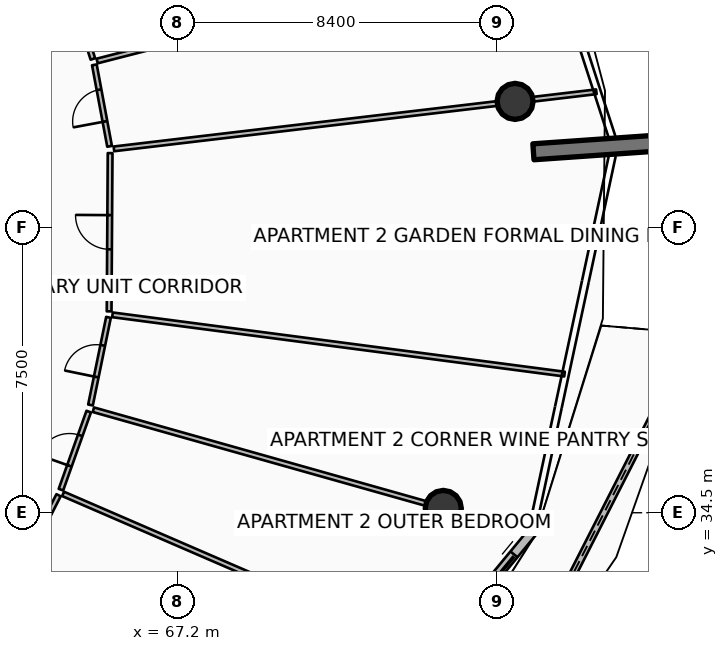
"""IFC4 building model, lengths in metres.
Left out: names, types, materials, properties, quantities, classifications, styles, units other than length and angle.
Written with IfcOpenShell. Run it as: python <this file> out.ifc"""

import sys

from ifc_helpers import new_model, si_unit, direction, frame, frame_2d, origin, origin_2d, place, context, subcontext, project, spatial, polyline, rectangle, circle, outline, extrude, element, fill, save


model = new_model("IFC4")
c1 = context("Model", 3, precision=1e-05, world=origin(), true_north=direction((0.0, 1.0)))
c2 = subcontext(c1, "Body", "Model", "MODEL_VIEW")
j1 = project(units=[si_unit("LENGTHUNIT", "METRE"), si_unit("PLANEANGLEUNIT", "RADIAN")], contexts=[c1])
p1 = place(None, origin())
s1 = spatial("IfcSite", under=j1, at=p1, CompositionType="ELEMENT")
p2 = place(p1, origin())
s2 = spatial("IfcBuilding", under=s1, at=p2, CompositionType="ELEMENT")
p3 = place(p2, frame((0.0, 0.0, 302.15)))
s3 = spatial("IfcBuildingStorey", under=s2, at=p3, CompositionType="ELEMENT", Elevation=302.15)
p4 = place(p3, frame((76.562, 43.997, 0.0), z_axis=(0.0, 0.0, 1.0), x_axis=(0.997563824095, 0.069759707979, 0.0)))
e1 = element("IfcWall", 1, at=p4, inside=s3, PredefinedType="SOLIDWALL", context=c2, shape_type="SweptSolid", body=[
    extrude(rectangle(XDim=3.5, YDim=0.42, at=frame_2d((1.75, 0.0))), origin(), (0.0, 0.0, 1.0), 3.85),
])
p5 = place(p3, frame((74.191, 34.613, 0.0), z_axis=(-0.301218130551, 0.085015826673, 0.949757835999), x_axis=(-0.271628463208, -0.962402191381, 0.0)))
e2 = element("IfcColumn", 2, at=p5, inside=s3, PredefinedType="COLUMN", context=c2, shape_type="SweptSolid", body=[
    extrude(circle(Radius=0.475, at=origin_2d()), origin(), (0.0, 0.0, 1.0), 3.633),
])
p6 = place(p3, frame((76.08, 45.323, 0.0), z_axis=(-0.321796334521, -0.038090724848, 0.946042396391), x_axis=(0.117548410709, -0.993067153389, 0.0)))
e3 = element("IfcColumn", 3, at=p6, inside=s3, PredefinedType="COLUMN", context=c2, shape_type="SweptSolid", body=[
    extrude(circle(Radius=0.475, at=origin_2d()), origin(), (0.0, 0.0, 1.0), 3.647),
])
p7 = place(p3, frame((75.242, 28.254, 0.0), z_axis=(0.0, 0.0, 1.0), x_axis=(0.45375182612, 0.891128094211, 0.0)))
e4 = element("IfcWall", 4, at=p7, inside=s3, PredefinedType="PARAPET", context=c2, shape_type="SweptSolid", body=[
    extrude(outline(polyline([(0.0, 0.0), (12.3, 0.0), (12.3, 1.747), (6.15, 1.562), (0.0, 1.348), (0.0, 0.0)])), frame((0.0, 0.09, 0.0), z_axis=(0.0, -1.0, 0.0), x_axis=(1.0, 0.0, 0.0)), (0.0, 0.0, 1.0), 0.18),
])
p8 = place(p3, frame((69.258, 25.178, 0.0), z_axis=(0.0, 0.0, 1.0), x_axis=(0.636680093065, 0.771128043255, 0.0)))
e5 = element("IfcWall", 5, at=p8, inside=s3, PredefinedType="SOLIDWALL", context=c2, shape_type="SweptSolid", body=[
    extrude(rectangle(XDim=11.438, YDim=0.24, at=frame_2d((5.719, 0.0))), origin(), (0.0, 0.0, 1.0), 2.4),
])
p9 = place(p8, frame((9.218, 0.0, 0.0)))
e6 = element("IfcOpeningElement", 6, at=p9, cuts=e5, PredefinedType="OPENING", context=c2, shape_type="SweptSolid", body=[
    extrude(rectangle(XDim=1.45, YDim=2.15, at=frame_2d((0.725, 1.075))), frame((0.0, 0.13, 0.0), z_axis=(0.0, -1.0, 0.0), x_axis=(1.0, 0.0, 0.0)), (0.0, 0.0, 1.0), 0.26),
])
p10 = place(p8, frame((0.28, 0.0, 0.65)))
e7 = element("IfcOpeningElement", 7, at=p10, cuts=e5, PredefinedType="OPENING", context=c2, shape_type="SweptSolid", body=[
    extrude(rectangle(XDim=1.6, YDim=1.5, at=frame_2d((0.8, 0.75))), frame((0.0, 0.13, 0.0), z_axis=(0.0, -1.0, 0.0), x_axis=(1.0, 0.0, 0.0)), (0.0, 0.0, 1.0), 0.26),
])
p11 = place(p3, frame((63.18, 33.023, 0.0), z_axis=(0.0, 0.0, 1.0), x_axis=(0.860726523095, -0.509067630517, 0.0)))
e8 = element("IfcWall", 8, at=p11, inside=s3, PredefinedType="PARTITIONING", context=c2, shape_type="SweptSolid", body=[
    extrude(rectangle(XDim=9.675, YDim=0.125, at=frame_2d((4.837, 0.0))), origin(), (0.0, 0.0, 1.0), 2.425),
])
p12 = place(p3, frame((64.186, 34.996, 0.0), z_axis=(0.0, 0.0, 1.0), x_axis=(0.917756293165, -0.397144037292, 0.0)))
e9 = element("IfcWall", 9, at=p12, inside=s3, PredefinedType="PARTITIONING", context=c2, shape_type="SweptSolid", body=[
    extrude(rectangle(XDim=10.454, YDim=0.125, at=frame_2d((5.227, 0.0))), origin(), (0.0, 0.0, 1.0), 2.425),
])
p13 = place(p3, frame((63.139, 33.14, 0.0), z_axis=(0.0, 0.0, 1.0), x_axis=(0.454034960647, 0.890983868827, 0.0)))
e10 = element("IfcWall", 10, at=p13, inside=s3, PredefinedType="PARTITIONING", context=c2, shape_type="SweptSolid", body=[
    extrude(rectangle(XDim=2.043, YDim=0.125, at=frame_2d((1.021, 0.0))), origin(), (0.0, 0.0, 1.0), 2.89),
])
p14 = place(p13, frame((0.597, 0.0, 0.0)))
e11 = element("IfcOpeningElement", 11, at=p14, cuts=e10, PredefinedType="OPENING", context=c2, shape_type="SweptSolid", body=[
    extrude(rectangle(XDim=0.85, YDim=2.06, at=frame_2d((0.425, 1.03))), frame((0.0, 0.073, 0.0), z_axis=(0.0, -1.0, 0.0), x_axis=(1.0, 0.0, 0.0)), (0.0, 0.0, 1.0), 0.145),
])
p15 = place(p3, frame((64.13, 35.107, 0.0), z_axis=(0.0, 0.0, 1.0), x_axis=(0.335038376523, 0.942204482189, 0.0)))
e12 = element("IfcWall", 12, at=p15, inside=s3, PredefinedType="PARTITIONING", context=c2, shape_type="SweptSolid", body=[
    extrude(rectangle(XDim=2.181, YDim=0.125, at=frame_2d((1.09, 0.0))), origin(), (0.0, 0.0, 1.0), 2.407),
])
p16 = place(p15, frame((0.666, 0.0, 0.0)))
e13 = element("IfcOpeningElement", 13, at=p16, cuts=e12, PredefinedType="OPENING", context=c2, shape_type="SweptSolid", body=[
    extrude(rectangle(XDim=0.85, YDim=2.06, at=frame_2d((0.425, 1.03))), frame((0.0, 0.073, 0.0), z_axis=(0.0, -1.0, 0.0), x_axis=(1.0, 0.0, 0.0)), (0.0, 0.0, 1.0), 0.145),
])
p17 = place(p3, frame((64.983, 37.21, 0.0), z_axis=(0.0, 0.0, 1.0), x_axis=(0.962453678557, -0.271445973691, 0.0)))
e14 = element("IfcWall", 14, at=p17, inside=s3, PredefinedType="PARTITIONING", context=c2, shape_type="SweptSolid", body=[
    extrude(rectangle(XDim=11.85, YDim=0.125, at=frame_2d((5.925, 0.0))), origin(), (0.0, 0.0, 1.0), 2.407),
])
p18 = place(p3, frame((65.486, 39.707, 0.0), z_axis=(0.0, 0.0, 1.0), x_axis=(0.991513831428, -0.130001238792, 0.0)))
e15 = element("IfcWall", 15, at=p18, inside=s3, PredefinedType="PARTITIONING", context=c2, shape_type="SweptSolid", body=[
    extrude(rectangle(XDim=11.997, YDim=0.125, at=frame_2d((5.998, 0.0))), origin(), (0.0, 0.0, 1.0), 2.425),
])
p19 = place(p3, frame((64.907, 37.335, 0.0), z_axis=(0.0, 0.0, 1.0), x_axis=(0.201360200042, 0.979517263676, 0.0)))
e16 = element("IfcWall", 16, at=p19, inside=s3, PredefinedType="PARTITIONING", context=c2, shape_type="SweptSolid", body=[
    extrude(rectangle(XDim=2.353, YDim=0.125, at=frame_2d((1.177, 0.0))), origin(), (0.0, 0.0, 1.0), 2.407),
])
p20 = place(p19, frame((0.752, 0.0, 0.0)))
e17 = element("IfcOpeningElement", 17, at=p20, cuts=e16, PredefinedType="OPENING", context=c2, shape_type="SweptSolid", body=[
    extrude(rectangle(XDim=0.85, YDim=2.06, at=frame_2d((0.425, 1.03))), frame((0.0, 0.073, 0.0), z_axis=(0.0, -1.0, 0.0), x_axis=(1.0, 0.0, 0.0)), (0.0, 0.0, 1.0), 0.145),
])
p21 = place(p3, frame((65.398, 39.799, 0.0), z_axis=(0.0, 0.0, 1.0), x_axis=(0.006274064384, 0.999980317864, 0.0)))
e18 = element("IfcWall", 18, at=p21, inside=s3, PredefinedType="PARTITIONING", context=c2, shape_type="SweptSolid", body=[
    extrude(rectangle(XDim=4.164, YDim=0.125, at=frame_2d((2.082, 0.0))), origin(), (0.0, 0.0, 1.0), 2.407),
])
p22 = place(p21, frame((1.632, 0.0, 0.0)))
e19 = element("IfcOpeningElement", 19, at=p22, cuts=e18, PredefinedType="OPENING", context=c2, shape_type="SweptSolid", body=[
    extrude(rectangle(XDim=0.9, YDim=2.08, at=frame_2d((0.45, 1.04))), frame((0.0, 0.073, 0.0), z_axis=(0.0, -1.0, 0.0), x_axis=(1.0, 0.0, 0.0)), (0.0, 0.0, 1.0), 0.145),
])
p23 = place(p3, frame((65.524, 44.074, 0.0), z_axis=(0.0, 0.0, 1.0), x_axis=(0.993069543008, 0.117528221075, 0.0)))
e20 = element("IfcWall", 20, at=p23, inside=s3, PredefinedType="PARTITIONING", context=c2, shape_type="SweptSolid", body=[
    extrude(rectangle(XDim=12.784, YDim=0.125, at=frame_2d((6.392, 0.0))), origin(), (0.0, 0.0, 1.0), 2.407),
])
p24 = place(p3, frame((65.082, 46.386, 0.0), z_axis=(0.0, 0.0, 1.0), x_axis=(0.968583522114, 0.248688481217, 0.0)))
e21 = element("IfcWall", 21, at=p24, inside=s3, PredefinedType="PARTITIONING", context=c2, shape_type="SweptSolid", body=[
    extrude(rectangle(XDim=12.268, YDim=0.125, at=frame_2d((6.134, 0.0))), origin(), (0.0, 0.0, 1.0), 2.425),
])
p25 = place(p3, frame((65.41, 44.141, 0.0), z_axis=(0.0, 0.0, 1.0), x_axis=(-0.183463941639, 0.983026440193, 0.0)))
e22 = element("IfcWall", 22, at=p25, inside=s3, PredefinedType="PARTITIONING", context=c2, shape_type="SweptSolid", body=[
    extrude(rectangle(XDim=2.181, YDim=0.125, at=frame_2d((1.091, 0.0))), origin(), (0.0, 0.0, 1.0), 2.407),
])
p26 = place(p25, frame((0.666, 0.0, 0.0)))
e23 = element("IfcOpeningElement", 23, at=p26, cuts=e22, PredefinedType="OPENING", context=c2, shape_type="SweptSolid", body=[
    extrude(rectangle(XDim=0.85, YDim=2.06, at=frame_2d((0.425, 1.03))), frame((0.0, 0.073, 0.0), z_axis=(0.0, -1.0, 0.0), x_axis=(1.0, 0.0, 0.0)), (0.0, 0.0, 1.0), 0.145),
])
p27 = place(p3, frame((64.97, 46.44, 0.0), z_axis=(0.0, 0.0, 1.0), x_axis=(-0.305370578234, 0.952233590013, 0.0)))
e24 = element("IfcWall", 24, at=p27, inside=s3, PredefinedType="PARTITIONING", context=c2, shape_type="SweptSolid", body=[
    extrude(rectangle(XDim=1.906, YDim=0.125, at=frame_2d((0.953, 0.0))), origin(), (0.0, 0.0, 1.0), 2.89),
])
p28 = place(p27, frame((0.528, 0.0, 0.0)))
e25 = element("IfcOpeningElement", 25, at=p28, cuts=e24, PredefinedType="OPENING", context=c2, shape_type="SweptSolid", body=[
    extrude(rectangle(XDim=0.85, YDim=2.06, at=frame_2d((0.425, 1.03))), frame((0.0, 0.073, 0.0), z_axis=(0.0, -1.0, 0.0), x_axis=(1.0, 0.0, 0.0)), (0.0, 0.0, 1.0), 0.145),
])
p29 = place(p9, origin())
e26 = element("IfcDoor", 26, at=p29, inside=s3, OperationType="DOUBLE_DOOR_SLIDING", PredefinedType="DOOR", context=c2, shape_type="SweptSolid", body=[
    extrude(rectangle(XDim=1.45, YDim=2.15, at=frame_2d((0.725, 1.075))), frame((0.0, 0.025, 0.0), z_axis=(0.0, -1.0, 0.0), x_axis=(1.0, 0.0, 0.0)), (0.0, 0.0, 1.0), 0.05),
])
fill(e6, e26)
p30 = place(p16, origin())
e27 = element("IfcDoor", 27, at=p30, inside=s3, OperationType="SINGLE_SWING_LEFT", PredefinedType="DOOR", context=c2, shape_type="SweptSolid", body=[
    extrude(rectangle(XDim=0.85, YDim=2.06, at=frame_2d((0.425, 1.03))), frame((0.0, 0.025, 0.0), z_axis=(0.0, -1.0, 0.0), x_axis=(1.0, 0.0, 0.0)), (0.0, 0.0, 1.0), 0.05),
])
fill(e13, e27)
p31 = place(p20, origin())
e28 = element("IfcDoor", 28, at=p31, inside=s3, OperationType="SINGLE_SWING_LEFT", PredefinedType="DOOR", context=c2, shape_type="SweptSolid", body=[
    extrude(rectangle(XDim=0.85, YDim=2.06, at=frame_2d((0.425, 1.03))), frame((0.0, 0.025, 0.0), z_axis=(0.0, -1.0, 0.0), x_axis=(1.0, 0.0, 0.0)), (0.0, 0.0, 1.0), 0.05),
])
fill(e17, e28)
p32 = place(p22, origin())
e29 = element("IfcDoor", 29, at=p32, inside=s3, OperationType="SINGLE_SWING_RIGHT", PredefinedType="DOOR", context=c2, shape_type="SweptSolid", body=[
    extrude(rectangle(XDim=0.9, YDim=2.08, at=frame_2d((0.45, 1.04))), frame((0.0, 0.025, 0.0), z_axis=(0.0, -1.0, 0.0), x_axis=(1.0, 0.0, 0.0)), (0.0, 0.0, 1.0), 0.05),
])
fill(e19, e29)
p33 = place(p26, origin())
e30 = element("IfcDoor", 30, at=p33, inside=s3, OperationType="SINGLE_SWING_LEFT", PredefinedType="DOOR", context=c2, shape_type="SweptSolid", body=[
    extrude(rectangle(XDim=0.85, YDim=2.06, at=frame_2d((0.425, 1.03))), frame((0.0, 0.025, 0.0), z_axis=(0.0, -1.0, 0.0), x_axis=(1.0, 0.0, 0.0)), (0.0, 0.0, 1.0), 0.05),
])
fill(e23, e30)
save(model, sys.argv[1])
